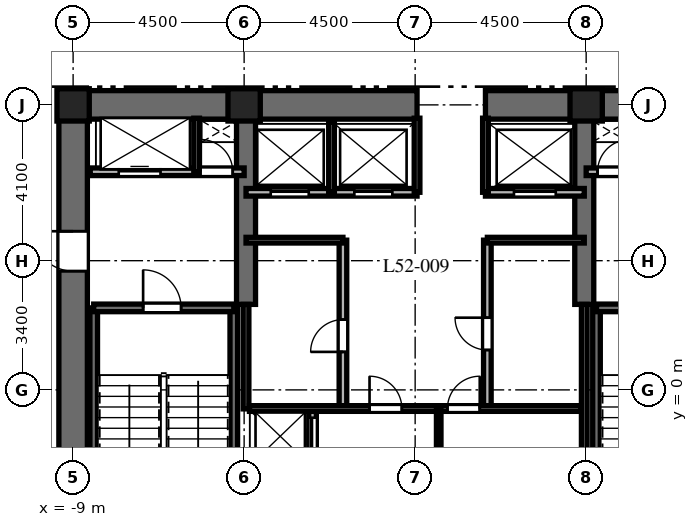
"""IFC4 building model, lengths in metres.
Left out: names, types, materials, properties, quantities, classifications, styles, units other than length and angle.
Written with IfcOpenShell. Run it as: python <this file> out.ifc"""

import sys

from ifc_helpers import new_model, si_unit, direction, frame, frame_2d, origin, origin_2d, place, context, subcontext, project, spatial, rectangle, extrude, element, fill, save


model = new_model("IFC4")
c1 = context("Model", 3, precision=1e-05, world=origin(), true_north=direction((0.0, 1.0)))
c2 = subcontext(c1, "Body", "Model", "MODEL_VIEW")
j1 = project(units=[si_unit("LENGTHUNIT", "METRE"), si_unit("PLANEANGLEUNIT", "RADIAN")], contexts=[c1])
p1 = place(None, origin())
s1 = spatial("IfcSite", under=j1, at=p1, CompositionType="ELEMENT")
p2 = place(p1, origin())
s2 = spatial("IfcBuilding", under=s1, at=p2, CompositionType="ELEMENT")
p3 = place(p2, frame((0.0, 0.0, 210.3)))
s3 = spatial("IfcBuildingStorey", under=s2, at=p3, CompositionType="ELEMENT", Elevation=210.3)
p4 = place(p3, frame((-9.375, 7.5, 0.0), z_axis=(0.0, 0.0, 1.0), x_axis=(1.0, 0.0, 0.0)))
e1 = element("IfcWall", 1, at=p4, inside=s3, PredefinedType="SHEAR", context=c2, shape_type="SweptSolid", body=[
    extrude(rectangle(XDim=9.425, YDim=0.75, at=frame_2d((4.712, 0.0))), origin(), (0.0, 0.0, 1.0), 3.8),
])
p5 = place(p3, frame((1.85, 7.5, 0.0), z_axis=(0.0, 0.0, 1.0), x_axis=(1.0, 0.0, 0.0)))
e2 = element("IfcWall", 2, at=p5, inside=s3, PredefinedType="SHEAR", context=c2, shape_type="SweptSolid", body=[
    extrude(rectangle(XDim=7.525, YDim=0.75, at=frame_2d((3.762, 0.0))), origin(), (0.0, 0.0, 1.0), 3.8),
])
p6 = place(p3, frame((-9.0, -7.125, 0.0), z_axis=(0.0, 0.0, 1.0), x_axis=(0.0, 1.0, 0.0)))
e3 = element("IfcWall", 3, at=p6, inside=s3, PredefinedType="SHEAR", context=c2, shape_type="SweptSolid", body=[
    extrude(rectangle(XDim=14.25, YDim=0.75, at=frame_2d((7.125, 0.0))), origin(), (0.0, 0.0, 1.0), 3.8),
])
p7 = place(p6, frame((10.25, 0.0, 0.0)))
e4 = element("IfcOpeningElement", 4, at=p7, cuts=e3, PredefinedType="OPENING", context=c2, shape_type="SweptSolid", body=[
    extrude(rectangle(XDim=1.05, YDim=2.15, at=frame_2d((0.525, 1.075))), frame((0.0, 0.385, 0.0), z_axis=(0.0, -1.0, 0.0), x_axis=(1.0, 0.0, 0.0)), (0.0, 0.0, 1.0), 0.77),
])
for number, where, z_axis, x_axis in (
    (5, (-4.45, 2.25, 0.0), (0.0, 0.0, 1.0), (0.0, 1.0, 0.0)),
    (6, (4.45, 2.25, 0.0), (0.0, 0.0, 1.0), (0.0, 1.0, 0.0)),
):
    element("IfcWall", number, at=place(p3, frame(where, z_axis=z_axis, x_axis=x_axis)), inside=s3, PredefinedType="SHEAR", context=c2, shape_type="SweptSolid", body=[
        extrude(rectangle(XDim=4.875, YDim=0.5, at=frame_2d((2.438, 0.0))), origin(), (0.0, 0.0, 1.0), 3.8),
    ])
for number, where, z_axis, x_axis in (
    (7, (-8.458, -6.985, 0.0), (0.0, 0.0, 1.0), (0.0, 1.0, 0.0)),
    (8, (-4.772, -6.985, 0.0), (0.0, 0.0, 1.0), (0.0, 1.0, 0.0)),
):
    element("IfcWall", number, at=place(p3, frame(where, z_axis=z_axis, x_axis=x_axis)), inside=s3, PredefinedType="SHEAR", context=c2, shape_type="SweptSolid", body=[
        extrude(rectangle(XDim=9.143, YDim=0.2, at=frame_2d((4.572, 0.0))), origin(), (0.0, 0.0, 1.0), 3.8),
    ])
p8 = place(p3, frame((-8.458, 2.158, 0.0), z_axis=(0.0, 0.0, 1.0), x_axis=(1.0, 0.0, 0.0)))
e9 = element("IfcWall", 9, at=p8, inside=s3, PredefinedType="SHEAR", context=c2, shape_type="SweptSolid", body=[
    extrude(rectangle(XDim=3.686, YDim=0.2, at=frame_2d((1.843, 0.0))), origin(), (0.0, 0.0, 1.0), 3.8),
])
p9 = place(p8, frame((1.3, 0.0, 0.0)))
e10 = element("IfcOpeningElement", 10, at=p9, cuts=e9, PredefinedType="OPENING", context=c2, shape_type="SweptSolid", body=[
    extrude(rectangle(XDim=1.0, YDim=2.15, at=frame_2d((0.5, 1.075))), frame((0.0, 0.11, 0.0), z_axis=(0.0, -1.0, 0.0), x_axis=(1.0, 0.0, 0.0)), (0.0, 0.0, 1.0), 0.22),
])
p10 = place(p3, frame((4.772, -6.985, 0.0), z_axis=(0.0, 0.0, 1.0), x_axis=(0.0, 1.0, 0.0)))
e11 = element("IfcWall", 11, at=p10, inside=s3, PredefinedType="SHEAR", context=c2, shape_type="SweptSolid", body=[
    extrude(rectangle(XDim=9.143, YDim=0.2, at=frame_2d((4.572, 0.0))), origin(), (0.0, 0.0, 1.0), 3.8),
])
p11 = place(p3, frame((4.772, 2.158, 0.0), z_axis=(0.0, 0.0, 1.0), x_axis=(1.0, 0.0, 0.0)))
e12 = element("IfcWall", 12, at=p11, inside=s3, PredefinedType="SHEAR", context=c2, shape_type="SweptSolid", body=[
    extrude(rectangle(XDim=3.686, YDim=0.2, at=frame_2d((1.843, 0.0))), origin(), (0.0, 0.0, 1.0), 3.8),
])
p12 = place(p11, frame((1.35, 0.0, 0.0)))
e13 = element("IfcOpeningElement", 13, at=p12, cuts=e12, PredefinedType="OPENING", context=c2, shape_type="SweptSolid", body=[
    extrude(rectangle(XDim=1.0, YDim=2.15, at=frame_2d((0.5, 1.075))), frame((0.0, 0.11, 0.0), z_axis=(0.0, -1.0, 0.0), x_axis=(1.0, 0.0, 0.0)), (0.0, 0.0, 1.0), 0.22),
])
for number, where, z_axis, x_axis in (
    (14, (4.5, 7.5, 0.0), (0.0, 0.0, 1.0), (1.0, 0.0, 0.0)),
    (15, (-4.5, 7.5, 0.0), (0.0, 0.0, 1.0), (1.0, 0.0, 0.0)),
    (16, (-9.0, 7.5, 0.0), (0.0, 0.0, 1.0), (1.0, 0.0, 0.0)),
):
    element("IfcColumn", number, at=place(p3, frame(where, z_axis=z_axis, x_axis=x_axis)), inside=s3, PredefinedType="COLUMN", context=c2, shape_type="SweptSolid", body=[
        extrude(rectangle(XDim=0.85, YDim=0.85, at=origin_2d()), origin(), (0.0, 0.0, 1.0), 3.8),
    ])
p13 = place(p3, frame((-8.55, 5.74, 0.0), z_axis=(0.0, 0.0, 1.0), x_axis=(1.0, 0.0, 0.0)))
e17 = element("IfcWall", 17, at=p13, inside=s3, PredefinedType="PARTITIONING", context=c2, shape_type="SweptSolid", body=[
    extrude(rectangle(XDim=4.05, YDim=0.2, at=frame_2d((2.025, 0.0))), origin(), (0.0, 0.0, 1.0), 3.5),
])
p14 = place(p13, frame((0.75, 0.0, 0.0)))
e18 = element("IfcOpeningElement", 18, at=p14, cuts=e17, PredefinedType="OPENING", context=c2, shape_type="SweptSolid", body=[
    extrude(rectangle(XDim=1.1, YDim=2.2, at=frame_2d((0.55, 1.1))), frame((0.0, 0.11, 0.0), z_axis=(0.0, -1.0, 0.0), x_axis=(1.0, 0.0, 0.0)), (0.0, 0.0, 1.0), 0.22),
])
p15 = place(p13, frame((2.9, 0.0, 0.0)))
e19 = element("IfcOpeningElement", 19, at=p15, cuts=e17, PredefinedType="OPENING", context=c2, shape_type="SweptSolid", body=[
    extrude(rectangle(XDim=0.85, YDim=2.03, at=frame_2d((0.425, 1.015))), frame((0.0, 0.11, 0.0), z_axis=(0.0, -1.0, 0.0), x_axis=(1.0, 0.0, 0.0)), (0.0, 0.0, 1.0), 0.22),
])
p16 = place(p3, frame((-5.75, 5.74, 0.0), z_axis=(0.0, 0.0, 1.0), x_axis=(0.0, 1.0, 0.0)))
e20 = element("IfcWall", 20, at=p16, inside=s3, PredefinedType="PARTITIONING", context=c2, shape_type="SweptSolid", body=[
    extrude(rectangle(XDim=1.41, YDim=0.15, at=frame_2d((0.705, 0.0))), origin(), (0.0, 0.0, 1.0), 3.5),
])
p17 = place(p3, frame((4.5, 5.74, 0.0), z_axis=(0.0, 0.0, 1.0), x_axis=(1.0, 0.0, 0.0)))
e21 = element("IfcWall", 21, at=p17, inside=s3, PredefinedType="PARTITIONING", context=c2, shape_type="SweptSolid", body=[
    extrude(rectangle(XDim=4.05, YDim=0.2, at=frame_2d((2.025, 0.0))), origin(), (0.0, 0.0, 1.0), 3.5),
])
p18 = place(p17, frame((0.3, 0.0, 0.0)))
e22 = element("IfcOpeningElement", 22, at=p18, cuts=e21, PredefinedType="OPENING", context=c2, shape_type="SweptSolid", body=[
    extrude(rectangle(XDim=0.85, YDim=2.03, at=frame_2d((0.425, 1.015))), frame((0.0, 0.11, 0.0), z_axis=(0.0, -1.0, 0.0), x_axis=(1.0, 0.0, 0.0)), (0.0, 0.0, 1.0), 0.22),
])
p19 = place(p17, frame((2.15, 0.0, 0.0)))
e23 = element("IfcOpeningElement", 23, at=p19, cuts=e21, PredefinedType="OPENING", context=c2, shape_type="SweptSolid", body=[
    extrude(rectangle(XDim=1.1, YDim=2.2, at=frame_2d((0.55, 1.1))), frame((0.0, 0.11, 0.0), z_axis=(0.0, -1.0, 0.0), x_axis=(1.0, 0.0, 0.0)), (0.0, 0.0, 1.0), 0.22),
])
p20 = place(p3, frame((-2.7, -1.972, 0.0), z_axis=(0.0, 0.0, 1.0), x_axis=(0.0, 1.0, 0.0)))
e24 = element("IfcWall", 24, at=p20, inside=s3, PredefinedType="PARTITIONING", context=c2, shape_type="SweptSolid", body=[
    extrude(rectangle(XDim=1.472, YDim=0.2, at=frame_2d((0.736, 0.0))), origin(), (0.0, 0.0, 1.0), 3.5),
])
p21 = place(p20, frame((0.24, 0.0, 0.0)))
e25 = element("IfcOpeningElement", 25, at=p21, cuts=e24, PredefinedType="OPENING", context=c2, shape_type="SweptSolid", body=[
    extrude(rectangle(XDim=1.0, YDim=2.2, at=frame_2d((0.5, 1.1))), frame((0.0, 0.11, 0.0), z_axis=(0.0, -1.0, 0.0), x_axis=(1.0, 0.0, 0.0)), (0.0, 0.0, 1.0), 0.22),
])
p22 = place(p3, frame((-4.45, 5.2, 0.0), z_axis=(0.0, 0.0, 1.0), x_axis=(1.0, 0.0, 0.0)))
e26 = element("IfcWall", 26, at=p22, inside=s3, PredefinedType="PARTITIONING", context=c2, shape_type="SweptSolid", body=[
    extrude(rectangle(XDim=4.5, YDim=0.2, at=frame_2d((2.25, 0.0))), origin(), (0.0, 0.0, 1.0), 3.5),
])
p23 = place(p22, frame((0.65, 0.0, 0.0)))
e27 = element("IfcOpeningElement", 27, at=p23, cuts=e26, PredefinedType="OPENING", context=c2, shape_type="SweptSolid", body=[
    extrude(rectangle(XDim=1.0, YDim=2.2, at=frame_2d((0.5, 1.1))), frame((0.0, 0.11, 0.0), z_axis=(0.0, -1.0, 0.0), x_axis=(1.0, 0.0, 0.0)), (0.0, 0.0, 1.0), 0.22),
])
p24 = place(p22, frame((2.85, 0.0, 0.0)))
e28 = element("IfcOpeningElement", 28, at=p24, cuts=e26, PredefinedType="OPENING", context=c2, shape_type="SweptSolid", body=[
    extrude(rectangle(XDim=1.0, YDim=2.2, at=frame_2d((0.5, 1.1))), frame((0.0, 0.11, 0.0), z_axis=(0.0, -1.0, 0.0), x_axis=(1.0, 0.0, 0.0)), (0.0, 0.0, 1.0), 0.22),
])
p25 = place(p3, frame((1.85, 5.2, 0.0), z_axis=(0.0, 0.0, 1.0), x_axis=(1.0, 0.0, 0.0)))
e29 = element("IfcWall", 29, at=p25, inside=s3, PredefinedType="PARTITIONING", context=c2, shape_type="SweptSolid", body=[
    extrude(rectangle(XDim=2.6, YDim=0.2, at=frame_2d((1.3, 0.0))), origin(), (0.0, 0.0, 1.0), 3.5),
])
p26 = place(p25, frame((0.75, 0.0, 0.0)))
e30 = element("IfcOpeningElement", 30, at=p26, cuts=e29, PredefinedType="OPENING", context=c2, shape_type="SweptSolid", body=[
    extrude(rectangle(XDim=1.1, YDim=2.2, at=frame_2d((0.55, 1.1))), frame((0.0, 0.11, 0.0), z_axis=(0.0, -1.0, 0.0), x_axis=(1.0, 0.0, 0.0)), (0.0, 0.0, 1.0), 0.22),
])
p27 = place(p3, frame((-2.2, 5.2, 0.0), z_axis=(0.0, 0.0, 1.0), x_axis=(0.0, 1.0, 0.0)))
e31 = element("IfcWall", 31, at=p27, inside=s3, PredefinedType="PARTITIONING", context=c2, shape_type="SweptSolid", body=[
    extrude(rectangle(XDim=1.85, YDim=0.15, at=frame_2d((0.925, 0.0))), origin(), (0.0, 0.0, 1.0), 3.5),
])
for number, where, z_axis, x_axis in (
    (32, (0.05, 5.2, 0.0), (0.0, 0.0, 1.0), (0.0, 1.0, 0.0)),
    (33, (1.85, 5.2, 0.0), (0.0, 0.0, 1.0), (0.0, 1.0, 0.0)),
):
    element("IfcWall", number, at=place(p3, frame(where, z_axis=z_axis, x_axis=x_axis)), inside=s3, PredefinedType="PARTITIONING", context=c2, shape_type="SweptSolid", body=[
        extrude(rectangle(XDim=1.95, YDim=0.15, at=frame_2d((0.975, 0.0))), origin(), (0.0, 0.0, 1.0), 3.5),
    ])
p28 = place(p3, frame((-4.45, -0.5, 0.0), z_axis=(0.0, 0.0, 1.0), x_axis=(0.0, 1.0, 0.0)))
e34 = element("IfcWall", 34, at=p28, inside=s3, PredefinedType="PARTITIONING", context=c2, shape_type="SweptSolid", body=[
    extrude(rectangle(XDim=2.75, YDim=0.15, at=frame_2d((1.375, 0.0))), origin(), (0.0, 0.0, 1.0), 3.5),
])
p29 = place(p3, frame((4.45, -1.972, 0.0), z_axis=(0.0, 0.0, 1.0), x_axis=(0.0, 1.0, 0.0)))
e35 = element("IfcWall", 35, at=p29, inside=s3, PredefinedType="PARTITIONING", context=c2, shape_type="SweptSolid", body=[
    extrude(rectangle(XDim=4.222, YDim=0.15, at=frame_2d((2.111, 0.0))), origin(), (0.0, 0.0, 1.0), 3.5),
])
p30 = place(p3, frame((-1.9, -0.5, 0.0), z_axis=(0.0, 0.0, 1.0), x_axis=(0.0, 1.0, 0.0)))
e36 = element("IfcWall", 36, at=p30, inside=s3, PredefinedType="PARTITIONING", context=c2, shape_type="SweptSolid", body=[
    extrude(rectangle(XDim=4.44, YDim=0.2, at=frame_2d((2.22, 0.0))), origin(), (0.0, 0.0, 1.0), 3.5),
])
p31 = place(p30, frame((1.5, 0.0, 0.0)))
e37 = element("IfcOpeningElement", 37, at=p31, cuts=e36, PredefinedType="OPENING", context=c2, shape_type="SweptSolid", body=[
    extrude(rectangle(XDim=0.85, YDim=2.03, at=frame_2d((0.425, 1.015))), frame((0.0, 0.11, 0.0), z_axis=(0.0, -1.0, 0.0), x_axis=(1.0, 0.0, 0.0)), (0.0, 0.0, 1.0), 0.22),
])
p32 = place(p3, frame((-4.45, 3.94, 0.0), z_axis=(0.0, 0.0, 1.0), x_axis=(1.0, 0.0, 0.0)))
e38 = element("IfcWall", 38, at=p32, inside=s3, PredefinedType="PARTITIONING", context=c2, shape_type="SweptSolid", body=[
    extrude(rectangle(XDim=2.55, YDim=0.15, at=frame_2d((1.275, 0.0))), origin(), (0.0, 0.0, 1.0), 3.5),
])
p33 = place(p3, frame((1.9, -0.5, 0.0), z_axis=(0.0, 0.0, 1.0), x_axis=(0.0, 1.0, 0.0)))
e39 = element("IfcWall", 39, at=p33, inside=s3, PredefinedType="PARTITIONING", context=c2, shape_type="SweptSolid", body=[
    extrude(rectangle(XDim=4.44, YDim=0.2, at=frame_2d((2.22, 0.0))), origin(), (0.0, 0.0, 1.0), 3.5),
])
p34 = place(p33, frame((1.55, 0.0, 0.0)))
e40 = element("IfcOpeningElement", 40, at=p34, cuts=e39, PredefinedType="OPENING", context=c2, shape_type="SweptSolid", body=[
    extrude(rectangle(XDim=0.85, YDim=2.03, at=frame_2d((0.425, 1.015))), frame((0.0, 0.11, 0.0), z_axis=(0.0, -1.0, 0.0), x_axis=(1.0, 0.0, 0.0)), (0.0, 0.0, 1.0), 0.22),
])
p35 = place(p3, frame((1.9, 3.94, 0.0), z_axis=(0.0, 0.0, 1.0), x_axis=(1.0, 0.0, 0.0)))
e41 = element("IfcWall", 41, at=p35, inside=s3, PredefinedType="PARTITIONING", context=c2, shape_type="SweptSolid", body=[
    extrude(rectangle(XDim=2.55, YDim=0.15, at=frame_2d((1.275, 0.0))), origin(), (0.0, 0.0, 1.0), 3.5),
])
p36 = place(p3, frame((-4.36, -0.49, 0.0), z_axis=(0.0, 0.0, 1.0), x_axis=(1.0, 0.0, 0.0)))
e42 = element("IfcWall", 42, at=p36, inside=s3, PredefinedType="PARTITIONING", context=c2, shape_type="SweptSolid", body=[
    extrude(rectangle(XDim=8.72, YDim=0.15, at=frame_2d((4.36, 0.0))), origin(), (0.0, 0.0, 1.0), 3.5),
])
p37 = place(p36, frame((3.16, 0.0, 0.0)))
e43 = element("IfcOpeningElement", 43, at=p37, cuts=e42, PredefinedType="OPENING", context=c2, shape_type="SweptSolid", body=[
    extrude(rectangle(XDim=0.85, YDim=2.03, at=frame_2d((0.425, 1.015))), frame((0.0, 0.085, 0.0), z_axis=(0.0, -1.0, 0.0), x_axis=(1.0, 0.0, 0.0)), (0.0, 0.0, 1.0), 0.17),
])
p38 = place(p36, frame((5.21, 0.0, 0.0)))
e44 = element("IfcOpeningElement", 44, at=p38, cuts=e42, PredefinedType="OPENING", context=c2, shape_type="SweptSolid", body=[
    extrude(rectangle(XDim=0.85, YDim=2.03, at=frame_2d((0.425, 1.015))), frame((0.0, 0.085, 0.0), z_axis=(0.0, -1.0, 0.0), x_axis=(1.0, 0.0, 0.0)), (0.0, 0.0, 1.0), 0.17),
])
p39 = place(p3, frame((0.62, -1.972, 0.0), z_axis=(0.0, 0.0, 1.0), x_axis=(0.0, 1.0, 0.0)))
e45 = element("IfcWall", 45, at=p39, inside=s3, PredefinedType="PARTITIONING", context=c2, shape_type="SweptSolid", body=[
    extrude(rectangle(XDim=1.472, YDim=0.12, at=frame_2d((0.736, 0.0))), origin(), (0.0, 0.0, 1.0), 3.5),
])
p40 = place(p9, origin())
e46 = element("IfcDoor", 46, at=p40, inside=s3, OperationType="SINGLE_SWING_LEFT", PredefinedType="DOOR", context=c2, shape_type="SweptSolid", body=[
    extrude(rectangle(XDim=1.0, YDim=2.15, at=frame_2d((0.5, 1.075))), frame((0.0, 0.025, 0.0), z_axis=(0.0, -1.0, 0.0), x_axis=(1.0, 0.0, 0.0)), (0.0, 0.0, 1.0), 0.05),
])
fill(e10, e46)
p41 = place(p7, origin())
e47 = element("IfcDoor", 47, at=p41, inside=s3, OperationType="SINGLE_SWING_RIGHT", PredefinedType="DOOR", context=c2, shape_type="SweptSolid", body=[
    extrude(rectangle(XDim=1.05, YDim=2.15, at=frame_2d((0.525, 1.075))), frame((0.0, 0.025, 0.0), z_axis=(0.0, -1.0, 0.0), x_axis=(1.0, 0.0, 0.0)), (0.0, 0.0, 1.0), 0.05),
])
fill(e4, e47)
p42 = place(p14, origin())
e48 = element("IfcDoor", 48, at=p42, inside=s3, OperationType="SLIDING_TO_LEFT", PredefinedType="DOOR", context=c2, shape_type="SweptSolid", body=[
    extrude(rectangle(XDim=1.1, YDim=2.2, at=frame_2d((0.55, 1.1))), frame((0.0, 0.025, 0.0), z_axis=(0.0, -1.0, 0.0), x_axis=(1.0, 0.0, 0.0)), (0.0, 0.0, 1.0), 0.05),
])
fill(e18, e48)
p43 = place(p15, origin())
e49 = element("IfcDoor", 49, at=p43, inside=s3, OperationType="SINGLE_SWING_LEFT", PredefinedType="DOOR", context=c2, shape_type="SweptSolid", body=[
    extrude(rectangle(XDim=0.85, YDim=2.03, at=frame_2d((0.425, 1.015))), frame((0.0, 0.025, 0.0), z_axis=(0.0, -1.0, 0.0), x_axis=(1.0, 0.0, 0.0)), (0.0, 0.0, 1.0), 0.05),
])
fill(e19, e49)
p44 = place(p18, origin())
e50 = element("IfcDoor", 50, at=p44, inside=s3, OperationType="SINGLE_SWING_RIGHT", PredefinedType="DOOR", context=c2, shape_type="SweptSolid", body=[
    extrude(rectangle(XDim=0.85, YDim=2.03, at=frame_2d((0.425, 1.015))), frame((0.0, 0.025, 0.0), z_axis=(0.0, -1.0, 0.0), x_axis=(1.0, 0.0, 0.0)), (0.0, 0.0, 1.0), 0.05),
])
fill(e22, e50)
p45 = place(p21, origin())
e51 = element("IfcDoor", 51, at=p45, inside=s3, OperationType="SLIDING_TO_LEFT", PredefinedType="DOOR", context=c2, shape_type="SweptSolid", body=[
    extrude(rectangle(XDim=1.0, YDim=2.2, at=frame_2d((0.5, 1.1))), frame((0.0, 0.025, 0.0), z_axis=(0.0, -1.0, 0.0), x_axis=(1.0, 0.0, 0.0)), (0.0, 0.0, 1.0), 0.05),
])
fill(e25, e51)
p46 = place(p23, origin())
e52 = element("IfcDoor", 52, at=p46, inside=s3, OperationType="SLIDING_TO_LEFT", PredefinedType="DOOR", context=c2, shape_type="SweptSolid", body=[
    extrude(rectangle(XDim=1.0, YDim=2.2, at=frame_2d((0.5, 1.1))), frame((0.0, 0.025, 0.0), z_axis=(0.0, -1.0, 0.0), x_axis=(1.0, 0.0, 0.0)), (0.0, 0.0, 1.0), 0.05),
])
fill(e27, e52)
p47 = place(p24, origin())
e53 = element("IfcDoor", 53, at=p47, inside=s3, OperationType="SLIDING_TO_RIGHT", PredefinedType="DOOR", context=c2, shape_type="SweptSolid", body=[
    extrude(rectangle(XDim=1.0, YDim=2.2, at=frame_2d((0.5, 1.1))), frame((0.0, 0.025, 0.0), z_axis=(0.0, -1.0, 0.0), x_axis=(1.0, 0.0, 0.0)), (0.0, 0.0, 1.0), 0.05),
])
fill(e28, e53)
p48 = place(p26, origin())
e54 = element("IfcDoor", 54, at=p48, inside=s3, OperationType="SLIDING_TO_RIGHT", PredefinedType="DOOR", context=c2, shape_type="SweptSolid", body=[
    extrude(rectangle(XDim=1.1, YDim=2.2, at=frame_2d((0.55, 1.1))), frame((0.0, 0.025, 0.0), z_axis=(0.0, -1.0, 0.0), x_axis=(1.0, 0.0, 0.0)), (0.0, 0.0, 1.0), 0.05),
])
fill(e30, e54)
p49 = place(p31, origin())
e55 = element("IfcDoor", 55, at=p49, inside=s3, OperationType="SINGLE_SWING_LEFT", PredefinedType="DOOR", context=c2, shape_type="SweptSolid", body=[
    extrude(rectangle(XDim=0.85, YDim=2.03, at=frame_2d((0.425, 1.015))), frame((0.0, 0.025, 0.0), z_axis=(0.0, -1.0, 0.0), x_axis=(1.0, 0.0, 0.0)), (0.0, 0.0, 1.0), 0.05),
])
fill(e37, e55)
p50 = place(p34, origin())
e56 = element("IfcDoor", 56, at=p50, inside=s3, OperationType="SINGLE_SWING_RIGHT", PredefinedType="DOOR", context=c2, shape_type="SweptSolid", body=[
    extrude(rectangle(XDim=0.85, YDim=2.03, at=frame_2d((0.425, 1.015))), frame((0.0, 0.025, 0.0), z_axis=(0.0, -1.0, 0.0), x_axis=(1.0, 0.0, 0.0)), (0.0, 0.0, 1.0), 0.05),
])
fill(e40, e56)
p51 = place(p37, origin())
e57 = element("IfcDoor", 57, at=p51, inside=s3, OperationType="SINGLE_SWING_LEFT", PredefinedType="DOOR", context=c2, shape_type="SweptSolid", body=[
    extrude(rectangle(XDim=0.85, YDim=2.03, at=frame_2d((0.425, 1.015))), frame((0.0, 0.025, 0.0), z_axis=(0.0, -1.0, 0.0), x_axis=(1.0, 0.0, 0.0)), (0.0, 0.0, 1.0), 0.05),
])
fill(e43, e57)
p52 = place(p38, origin())
e58 = element("IfcDoor", 58, at=p52, inside=s3, OperationType="SINGLE_SWING_RIGHT", PredefinedType="DOOR", context=c2, shape_type="SweptSolid", body=[
    extrude(rectangle(XDim=0.85, YDim=2.03, at=frame_2d((0.425, 1.015))), frame((0.0, 0.025, 0.0), z_axis=(0.0, -1.0, 0.0), x_axis=(1.0, 0.0, 0.0)), (0.0, 0.0, 1.0), 0.05),
])
fill(e44, e58)
save(model, sys.argv[1])
